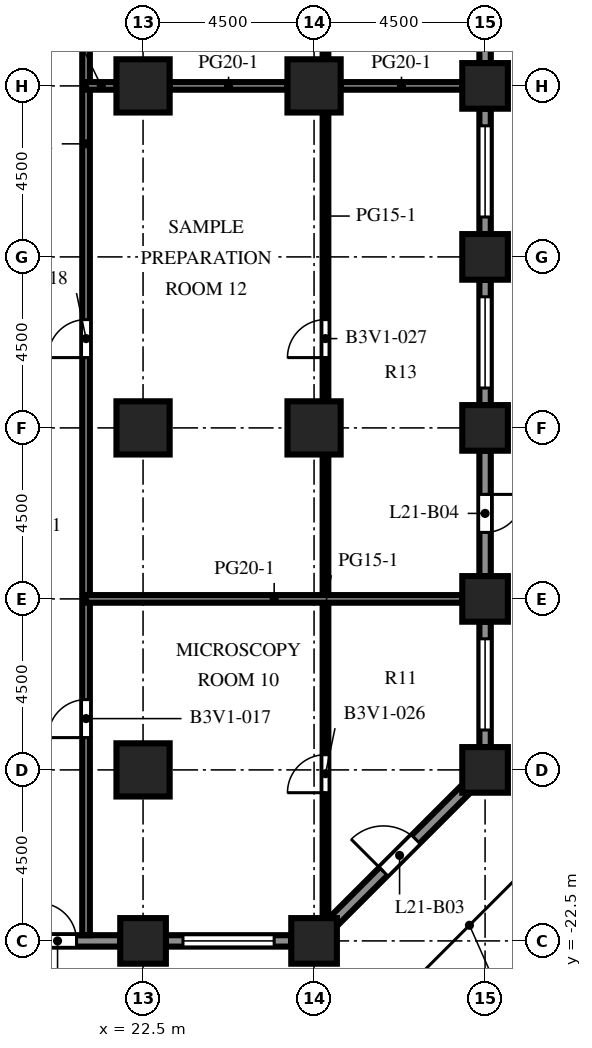
"""IFC4 building model, lengths in metres.
Left out: names, types, materials, properties, quantities, classifications, styles, units other than length and angle.
Written with IfcOpenShell. Run it as: python <this file> out.ifc"""

import sys

from ifc_helpers import new_model, si_unit, direction, frame, frame_2d, origin, origin_2d, place, context, subcontext, project, spatial, rectangle, extrude, element, fill, save


model = new_model("IFC4")
c1 = context("Model", 3, precision=1e-05, world=origin(), true_north=direction((0.0, 1.0)))
c2 = subcontext(c1, "Body", "Model", "MODEL_VIEW")
j1 = project(units=[si_unit("LENGTHUNIT", "METRE"), si_unit("PLANEANGLEUNIT", "RADIAN")], contexts=[c1])
p1 = place(None, origin())
s1 = spatial("IfcSite", under=j1, at=p1, CompositionType="ELEMENT")
p2 = place(p1, origin())
s2 = spatial("IfcBuilding", under=s1, at=p2, CompositionType="ELEMENT")
p3 = place(p2, frame((0.0, 0.0, 94.3)))
s3 = spatial("IfcBuildingStorey", under=s2, at=p3, CompositionType="ELEMENT", Elevation=94.3)
for number, where, z_axis, x_axis in (
    (1, (22.5, -22.5, 0.0), (0.0, 0.0, 1.0), (1.0, 0.0, 0.0)),
    (2, (27.0, -22.5, 0.0), (0.0, 0.0, 1.0), (1.0, 0.0, 0.0)),
    (3, (31.5, -18.0, 0.0), (0.0, 0.0, 1.0), (1.0, 0.0, 0.0)),
    (4, (31.5, -13.5, 0.0), (0.0, 0.0, 1.0), (1.0, 0.0, 0.0)),
    (5, (31.5, -9.0, 0.0), (0.0, 0.0, 1.0), (1.0, 0.0, 0.0)),
    (6, (31.5, -4.5, 0.0), (0.0, 0.0, 1.0), (1.0, 0.0, 0.0)),
    (7, (31.5, 0.0, 0.0), (0.0, 0.0, 1.0), (1.0, 0.0, 0.0)),
):
    element("IfcColumn", number, at=place(p3, frame(where, z_axis=z_axis, x_axis=x_axis)), inside=s3, PredefinedType="COLUMN", context=c2, shape_type="SweptSolid", body=[
        extrude(rectangle(XDim=1.2, YDim=1.2, at=origin_2d()), origin(), (0.0, 0.0, 1.0), 4.1),
    ])
for number, where, z_axis, x_axis in (
    (8, (22.5, -18.0, 0.0), (0.0, 0.0, 1.0), (1.0, 0.0, 0.0)),
    (9, (22.5, -9.0, 0.0), (0.0, 0.0, 1.0), (1.0, 0.0, 0.0)),
    (10, (22.5, 0.0, 0.0), (0.0, 0.0, 1.0), (1.0, 0.0, 0.0)),
    (11, (27.0, -9.0, 0.0), (0.0, 0.0, 1.0), (1.0, 0.0, 0.0)),
    (12, (27.0, 0.0, 0.0), (0.0, 0.0, 1.0), (1.0, 0.0, 0.0)),
):
    element("IfcColumn", number, at=place(p3, frame(where, z_axis=z_axis, x_axis=x_axis)), inside=s3, PredefinedType="COLUMN", context=c2, shape_type="SweptSolid", body=[
        extrude(rectangle(XDim=1.4, YDim=1.4, at=origin_2d()), origin(), (0.0, 0.0, 1.0), 4.1),
    ])
p4 = place(p3, frame((21.9, -22.5, 0.0), z_axis=(0.0, 0.0, 1.0), x_axis=(-1.0, 0.0, 0.0)))
e13 = element("IfcWall", 13, at=p4, inside=s3, PredefinedType="SOLIDWALL", context=c2, shape_type="SweptSolid", body=[
    extrude(rectangle(XDim=3.3, YDim=0.3, at=frame_2d((1.65, 0.0))), origin(), (0.0, 0.0, 1.0), 2.75),
])
p5 = place(p4, frame((1.15, 0.0, 0.0)))
e14 = element("IfcOpeningElement", 14, at=p5, cuts=e13, PredefinedType="OPENING", context=c2, shape_type="SweptSolid", body=[
    extrude(rectangle(XDim=1.0, YDim=2.2, at=frame_2d((0.5, 1.1))), frame((0.0, 0.16, 0.0), z_axis=(0.0, -1.0, 0.0), x_axis=(1.0, 0.0, 0.0)), (0.0, 0.0, 1.0), 0.32),
])
p6 = place(p3, frame((26.4, -22.5, 0.0), z_axis=(0.0, 0.0, 1.0), x_axis=(-1.0, 0.0, 0.0)))
e15 = element("IfcWall", 15, at=p6, inside=s3, PredefinedType="SOLIDWALL", context=c2, shape_type="SweptSolid", body=[
    extrude(rectangle(XDim=3.3, YDim=0.3, at=frame_2d((1.65, 0.0))), origin(), (0.0, 0.0, 1.0), 2.75),
])
p7 = place(p6, frame((0.45, 0.0, 0.8)))
e16 = element("IfcOpeningElement", 16, at=p7, cuts=e15, PredefinedType="OPENING", context=c2, shape_type="SweptSolid", body=[
    extrude(rectangle(XDim=2.4, YDim=1.7, at=frame_2d((1.2, 0.85))), frame((0.0, 0.16, 0.0), z_axis=(0.0, -1.0, 0.0), x_axis=(1.0, 0.0, 0.0)), (0.0, 0.0, 1.0), 0.32),
])
p8 = place(p3, frame((31.006, -18.494, 0.0), z_axis=(0.0, 0.0, 1.0), x_axis=(-0.707106781187, -0.707106781187, 0.0)))
e17 = element("IfcWall", 17, at=p8, inside=s3, PredefinedType="SOLIDWALL", context=c2, shape_type="SweptSolid", body=[
    extrude(rectangle(XDim=4.967, YDim=0.3, at=frame_2d((2.483, 0.0))), origin(), (0.0, 0.0, 1.0), 2.75),
])
p9 = place(p8, frame((1.884, 0.0, 0.0)))
e18 = element("IfcOpeningElement", 18, at=p9, cuts=e17, PredefinedType="OPENING", context=c2, shape_type="SweptSolid", body=[
    extrude(rectangle(XDim=1.2, YDim=2.2, at=frame_2d((0.6, 1.1))), frame((0.0, 0.16, 0.0), z_axis=(0.0, -1.0, 0.0), x_axis=(1.0, 0.0, 0.0)), (0.0, 0.0, 1.0), 0.32),
])
p10 = place(p3, frame((31.5, -14.1, 0.0), z_axis=(0.0, 0.0, 1.0), x_axis=(0.0, -1.0, 0.0)))
e19 = element("IfcWall", 19, at=p10, inside=s3, PredefinedType="SOLIDWALL", context=c2, shape_type="SweptSolid", body=[
    extrude(rectangle(XDim=3.3, YDim=0.3, at=frame_2d((1.65, 0.0))), origin(), (0.0, 0.0, 1.0), 2.75),
])
p11 = place(p10, frame((0.45, 0.0, 0.8)))
e20 = element("IfcOpeningElement", 20, at=p11, cuts=e19, PredefinedType="OPENING", context=c2, shape_type="SweptSolid", body=[
    extrude(rectangle(XDim=2.4, YDim=1.7, at=frame_2d((1.2, 0.85))), frame((0.0, 0.16, 0.0), z_axis=(0.0, -1.0, 0.0), x_axis=(1.0, 0.0, 0.0)), (0.0, 0.0, 1.0), 0.32),
])
p12 = place(p3, frame((31.5, -9.6, 0.0), z_axis=(0.0, 0.0, 1.0), x_axis=(0.0, -1.0, 0.0)))
e21 = element("IfcWall", 21, at=p12, inside=s3, PredefinedType="SOLIDWALL", context=c2, shape_type="SweptSolid", body=[
    extrude(rectangle(XDim=3.3, YDim=0.3, at=frame_2d((1.65, 0.0))), origin(), (0.0, 0.0, 1.0), 2.75),
])
p13 = place(p12, frame((1.15, 0.0, 0.0)))
e22 = element("IfcOpeningElement", 22, at=p13, cuts=e21, PredefinedType="OPENING", context=c2, shape_type="SweptSolid", body=[
    extrude(rectangle(XDim=1.0, YDim=2.2, at=frame_2d((0.5, 1.1))), frame((0.0, 0.16, 0.0), z_axis=(0.0, -1.0, 0.0), x_axis=(1.0, 0.0, 0.0)), (0.0, 0.0, 1.0), 0.32),
])
p14 = place(p3, frame((31.5, -5.1, 0.0), z_axis=(0.0, 0.0, 1.0), x_axis=(0.0, -1.0, 0.0)))
e23 = element("IfcWall", 23, at=p14, inside=s3, PredefinedType="SOLIDWALL", context=c2, shape_type="SweptSolid", body=[
    extrude(rectangle(XDim=3.3, YDim=0.3, at=frame_2d((1.65, 0.0))), origin(), (0.0, 0.0, 1.0), 2.75),
])
p15 = place(p14, frame((0.45, 0.0, 0.8)))
e24 = element("IfcOpeningElement", 24, at=p15, cuts=e23, PredefinedType="OPENING", context=c2, shape_type="SweptSolid", body=[
    extrude(rectangle(XDim=2.4, YDim=1.7, at=frame_2d((1.2, 0.85))), frame((0.0, 0.16, 0.0), z_axis=(0.0, -1.0, 0.0), x_axis=(1.0, 0.0, 0.0)), (0.0, 0.0, 1.0), 0.32),
])
p16 = place(p3, frame((31.5, -0.6, 0.0), z_axis=(0.0, 0.0, 1.0), x_axis=(0.0, -1.0, 0.0)))
e25 = element("IfcWall", 25, at=p16, inside=s3, PredefinedType="SOLIDWALL", context=c2, shape_type="SweptSolid", body=[
    extrude(rectangle(XDim=3.3, YDim=0.3, at=frame_2d((1.65, 0.0))), origin(), (0.0, 0.0, 1.0), 2.75),
])
p17 = place(p16, frame((0.45, 0.0, 0.8)))
e26 = element("IfcOpeningElement", 26, at=p17, cuts=e25, PredefinedType="OPENING", context=c2, shape_type="SweptSolid", body=[
    extrude(rectangle(XDim=2.4, YDim=1.7, at=frame_2d((1.2, 0.85))), frame((0.0, 0.16, 0.0), z_axis=(0.0, -1.0, 0.0), x_axis=(1.0, 0.0, 0.0)), (0.0, 0.0, 1.0), 0.32),
])
p18 = place(p3, frame((31.5, 3.9, 0.0), z_axis=(0.0, 0.0, 1.0), x_axis=(0.0, -1.0, 0.0)))
e27 = element("IfcWall", 27, at=p18, inside=s3, PredefinedType="SOLIDWALL", context=c2, shape_type="SweptSolid", body=[
    extrude(rectangle(XDim=3.3, YDim=0.3, at=frame_2d((1.65, 0.0))), origin(), (0.0, 0.0, 1.0), 2.75),
])
p19 = place(p18, frame((0.45, 0.0, 0.8)))
e28 = element("IfcOpeningElement", 28, at=p19, cuts=e27, PredefinedType="OPENING", context=c2, shape_type="SweptSolid", body=[
    extrude(rectangle(XDim=2.4, YDim=1.7, at=frame_2d((1.2, 0.85))), frame((0.0, 0.16, 0.0), z_axis=(0.0, -1.0, 0.0), x_axis=(1.0, 0.0, 0.0)), (0.0, 0.0, 1.0), 0.32),
])
p20 = place(p3, frame((21.0, 31.35, 0.0), z_axis=(0.0, 0.0, 1.0), x_axis=(0.0, -1.0, 0.0)))
e29 = element("IfcWall", 29, at=p20, inside=s3, PredefinedType="PARTITIONING", context=c2, shape_type="SweptSolid", body=[
    extrude(rectangle(XDim=53.7, YDim=0.2, at=frame_2d((26.85, 0.0))), origin(), (0.0, 0.0, 1.0), 3.65),
])
p21 = place(p20, frame((47.5, 0.0, 0.0)))
e30 = element("IfcOpeningElement", 30, at=p21, cuts=e29, PredefinedType="OPENING", context=c2, shape_type="SweptSolid", body=[
    extrude(rectangle(XDim=1.0, YDim=2.1, at=frame_2d((0.5, 1.05))), frame((0.0, 0.11, 0.0), z_axis=(0.0, -1.0, 0.0), x_axis=(1.0, 0.0, 0.0)), (0.0, 0.0, 1.0), 0.22),
])
p22 = place(p20, frame((37.5, 0.0, 0.0)))
e31 = element("IfcOpeningElement", 31, at=p22, cuts=e29, PredefinedType="OPENING", context=c2, shape_type="SweptSolid", body=[
    extrude(rectangle(XDim=1.0, YDim=2.1, at=frame_2d((0.5, 1.05))), frame((0.0, 0.11, 0.0), z_axis=(0.0, -1.0, 0.0), x_axis=(1.0, 0.0, 0.0)), (0.0, 0.0, 1.0), 0.22),
])
p23 = place(p20, frame((27.25, 0.0, 0.0)))
e32 = element("IfcOpeningElement", 32, at=p23, cuts=e29, PredefinedType="OPENING", context=c2, shape_type="SweptSolid", body=[
    extrude(rectangle(XDim=1.0, YDim=2.1, at=frame_2d((0.5, 1.05))), frame((0.0, 0.11, 0.0), z_axis=(0.0, -1.0, 0.0), x_axis=(1.0, 0.0, 0.0)), (0.0, 0.0, 1.0), 0.22),
])
p24 = place(p20, frame((17.5, 0.0, 0.0)))
e33 = element("IfcOpeningElement", 33, at=p24, cuts=e29, PredefinedType="OPENING", context=c2, shape_type="SweptSolid", body=[
    extrude(rectangle(XDim=1.0, YDim=2.1, at=frame_2d((0.5, 1.05))), frame((0.0, 0.11, 0.0), z_axis=(0.0, -1.0, 0.0), x_axis=(1.0, 0.0, 0.0)), (0.0, 0.0, 1.0), 0.22),
])
p25 = place(p20, frame((10.75, 0.0, 0.0)))
e34 = element("IfcOpeningElement", 34, at=p25, cuts=e29, PredefinedType="OPENING", context=c2, shape_type="SweptSolid", body=[
    extrude(rectangle(XDim=1.0, YDim=2.1, at=frame_2d((0.5, 1.05))), frame((0.0, 0.11, 0.0), z_axis=(0.0, -1.0, 0.0), x_axis=(1.0, 0.0, 0.0)), (0.0, 0.0, 1.0), 0.22),
])
p26 = place(p20, frame((5.25, 0.0, 0.0)))
e35 = element("IfcOpeningElement", 35, at=p26, cuts=e29, PredefinedType="OPENING", context=c2, shape_type="SweptSolid", body=[
    extrude(rectangle(XDim=1.0, YDim=2.1, at=frame_2d((0.5, 1.05))), frame((0.0, 0.11, 0.0), z_axis=(0.0, -1.0, 0.0), x_axis=(1.0, 0.0, 0.0)), (0.0, 0.0, 1.0), 0.22),
])
p27 = place(p3, frame((27.3, -9.7, 0.0), z_axis=(0.0, 0.0, 1.0), x_axis=(0.0, -1.0, 0.0)))
e36 = element("IfcWall", 36, at=p27, inside=s3, PredefinedType="PARTITIONING", context=c2, shape_type="SweptSolid", body=[
    extrude(rectangle(XDim=12.077, YDim=0.15, at=frame_2d((6.039, 0.0))), origin(), (0.0, 0.0, 1.0), 3.65),
])
p28 = place(p27, frame((7.9, 0.0, 0.0)))
e37 = element("IfcOpeningElement", 37, at=p28, cuts=e36, PredefinedType="OPENING", context=c2, shape_type="SweptSolid", body=[
    extrude(rectangle(XDim=1.0, YDim=2.1, at=frame_2d((0.5, 1.05))), frame((0.0, 0.085, 0.0), z_axis=(0.0, -1.0, 0.0), x_axis=(1.0, 0.0, 0.0)), (0.0, 0.0, 1.0), 0.17),
])
p29 = place(p3, frame((27.3, -0.7, 0.0), z_axis=(0.0, 0.0, 1.0), x_axis=(0.0, -1.0, 0.0)))
e38 = element("IfcWall", 38, at=p29, inside=s3, PredefinedType="PARTITIONING", context=c2, shape_type="SweptSolid", body=[
    extrude(rectangle(XDim=7.6, YDim=0.15, at=frame_2d((3.8, 0.0))), origin(), (0.0, 0.0, 1.0), 3.65),
])
p30 = place(p29, frame((5.45, 0.0, 0.0)))
e39 = element("IfcOpeningElement", 39, at=p30, cuts=e38, PredefinedType="OPENING", context=c2, shape_type="SweptSolid", body=[
    extrude(rectangle(XDim=1.0, YDim=2.1, at=frame_2d((0.5, 1.05))), frame((0.0, 0.085, 0.0), z_axis=(0.0, -1.0, 0.0), x_axis=(1.0, 0.0, 0.0)), (0.0, 0.0, 1.0), 0.17),
])
p31 = place(p3, frame((27.3, 8.3, 0.0), z_axis=(0.0, 0.0, 1.0), x_axis=(0.0, -1.0, 0.0)))
e40 = element("IfcWall", 40, at=p31, inside=s3, PredefinedType="PARTITIONING", context=c2, shape_type="SweptSolid", body=[
    extrude(rectangle(XDim=7.6, YDim=0.15, at=frame_2d((3.8, 0.0))), origin(), (0.0, 0.0, 1.0), 3.65),
])
p32 = place(p31, frame((2.7, 0.0, 0.0)))
e41 = element("IfcOpeningElement", 41, at=p32, cuts=e40, PredefinedType="OPENING", context=c2, shape_type="SweptSolid", body=[
    extrude(rectangle(XDim=1.0, YDim=2.1, at=frame_2d((0.5, 1.05))), frame((0.0, 0.085, 0.0), z_axis=(0.0, -1.0, 0.0), x_axis=(1.0, 0.0, 0.0)), (0.0, 0.0, 1.0), 0.17),
])
p33 = place(p3, frame((21.0, -13.5, 0.0), z_axis=(0.0, 0.0, 1.0), x_axis=(1.0, 0.0, 0.0)))
e42 = element("IfcWall", 42, at=p33, inside=s3, PredefinedType="PARTITIONING", context=c2, shape_type="SweptSolid", body=[
    extrude(rectangle(XDim=9.9, YDim=0.2, at=frame_2d((4.95, 0.0))), origin(), (0.0, 0.0, 1.0), 3.65),
])
p34 = place(p3, frame((21.0, 0.0, 0.0), z_axis=(0.0, 0.0, 1.0), x_axis=(1.0, 0.0, 0.0)))
e43 = element("IfcWall", 43, at=p34, inside=s3, PredefinedType="PARTITIONING", context=c2, shape_type="SweptSolid", body=[
    extrude(rectangle(XDim=0.8, YDim=0.2, at=frame_2d((0.4, 0.0))), origin(), (0.0, 0.0, 1.0), 3.65),
])
p35 = place(p3, frame((23.2, 0.0, 0.0), z_axis=(0.0, 0.0, 1.0), x_axis=(1.0, 0.0, 0.0)))
e44 = element("IfcWall", 44, at=p35, inside=s3, PredefinedType="PARTITIONING", context=c2, shape_type="SweptSolid", body=[
    extrude(rectangle(XDim=3.1, YDim=0.2, at=frame_2d((1.55, 0.0))), origin(), (0.0, 0.0, 1.0), 3.65),
])
p36 = place(p3, frame((27.7, 0.0, 0.0), z_axis=(0.0, 0.0, 1.0), x_axis=(1.0, 0.0, 0.0)))
e45 = element("IfcWall", 45, at=p36, inside=s3, PredefinedType="PARTITIONING", context=c2, shape_type="SweptSolid", body=[
    extrude(rectangle(XDim=3.2, YDim=0.2, at=frame_2d((1.6, 0.0))), origin(), (0.0, 0.0, 1.0), 3.65),
])
p37 = place(p5, origin())
e46 = element("IfcDoor", 46, at=p37, inside=s3, OperationType="SINGLE_SWING_RIGHT", PredefinedType="DOOR", context=c2, shape_type="SweptSolid", body=[
    extrude(rectangle(XDim=1.0, YDim=2.2, at=frame_2d((0.5, 1.1))), frame((0.0, 0.025, 0.0), z_axis=(0.0, -1.0, 0.0), x_axis=(1.0, 0.0, 0.0)), (0.0, 0.0, 1.0), 0.05),
])
fill(e14, e46)
p38 = place(p7, origin())
e47 = element("IfcWindow", 47, at=p38, inside=s3, PartitioningType="SINGLE_PANEL", PredefinedType="WINDOW", context=c2, shape_type="SweptSolid", body=[
    extrude(rectangle(XDim=2.4, YDim=1.7, at=frame_2d((1.2, 0.85))), frame((0.0, 0.03, 0.0), z_axis=(0.0, -1.0, 0.0), x_axis=(1.0, 0.0, 0.0)), (0.0, 0.0, 1.0), 0.06),
])
fill(e16, e47)
p39 = place(p9, origin())
e48 = element("IfcDoor", 48, at=p39, inside=s3, OperationType="SINGLE_SWING_RIGHT", PredefinedType="DOOR", context=c2, shape_type="SweptSolid", body=[
    extrude(rectangle(XDim=1.2, YDim=2.2, at=frame_2d((0.6, 1.1))), frame((0.0, 0.025, 0.0), z_axis=(0.0, -1.0, 0.0), x_axis=(1.0, 0.0, 0.0)), (0.0, 0.0, 1.0), 0.05),
])
fill(e18, e48)
p40 = place(p11, origin())
e49 = element("IfcWindow", 49, at=p40, inside=s3, PartitioningType="SINGLE_PANEL", PredefinedType="WINDOW", context=c2, shape_type="SweptSolid", body=[
    extrude(rectangle(XDim=2.4, YDim=1.7, at=frame_2d((1.2, 0.85))), frame((0.0, 0.03, 0.0), z_axis=(0.0, -1.0, 0.0), x_axis=(1.0, 0.0, 0.0)), (0.0, 0.0, 1.0), 0.06),
])
fill(e20, e49)
p41 = place(p13, origin())
e50 = element("IfcDoor", 50, at=p41, inside=s3, OperationType="SINGLE_SWING_LEFT", PredefinedType="DOOR", context=c2, shape_type="SweptSolid", body=[
    extrude(rectangle(XDim=1.0, YDim=2.2, at=frame_2d((0.5, 1.1))), frame((0.0, 0.025, 0.0), z_axis=(0.0, -1.0, 0.0), x_axis=(1.0, 0.0, 0.0)), (0.0, 0.0, 1.0), 0.05),
])
fill(e22, e50)
p42 = place(p15, origin())
e51 = element("IfcWindow", 51, at=p42, inside=s3, PartitioningType="SINGLE_PANEL", PredefinedType="WINDOW", context=c2, shape_type="SweptSolid", body=[
    extrude(rectangle(XDim=2.4, YDim=1.7, at=frame_2d((1.2, 0.85))), frame((0.0, 0.03, 0.0), z_axis=(0.0, -1.0, 0.0), x_axis=(1.0, 0.0, 0.0)), (0.0, 0.0, 1.0), 0.06),
])
fill(e24, e51)
p43 = place(p17, origin())
e52 = element("IfcWindow", 52, at=p43, inside=s3, PartitioningType="SINGLE_PANEL", PredefinedType="WINDOW", context=c2, shape_type="SweptSolid", body=[
    extrude(rectangle(XDim=2.4, YDim=1.7, at=frame_2d((1.2, 0.85))), frame((0.0, 0.03, 0.0), z_axis=(0.0, -1.0, 0.0), x_axis=(1.0, 0.0, 0.0)), (0.0, 0.0, 1.0), 0.06),
])
fill(e26, e52)
p44 = place(p21, origin())
e53 = element("IfcDoor", 53, at=p44, inside=s3, OperationType="SINGLE_SWING_RIGHT", PredefinedType="DOOR", context=c2, shape_type="SweptSolid", body=[
    extrude(rectangle(XDim=1.0, YDim=2.1, at=frame_2d((0.5, 1.05))), frame((0.0, 0.025, 0.0), z_axis=(0.0, -1.0, 0.0), x_axis=(1.0, 0.0, 0.0)), (0.0, 0.0, 1.0), 0.05),
])
fill(e30, e53)
p45 = place(p22, origin())
e54 = element("IfcDoor", 54, at=p45, inside=s3, OperationType="SINGLE_SWING_RIGHT", PredefinedType="DOOR", context=c2, shape_type="SweptSolid", body=[
    extrude(rectangle(XDim=1.0, YDim=2.1, at=frame_2d((0.5, 1.05))), frame((0.0, 0.025, 0.0), z_axis=(0.0, -1.0, 0.0), x_axis=(1.0, 0.0, 0.0)), (0.0, 0.0, 1.0), 0.05),
])
fill(e31, e54)
p46 = place(p28, origin())
e55 = element("IfcDoor", 55, at=p46, inside=s3, OperationType="SINGLE_SWING_RIGHT", PredefinedType="DOOR", context=c2, shape_type="SweptSolid", body=[
    extrude(rectangle(XDim=1.0, YDim=2.1, at=frame_2d((0.5, 1.05))), frame((0.0, 0.025, 0.0), z_axis=(0.0, -1.0, 0.0), x_axis=(1.0, 0.0, 0.0)), (0.0, 0.0, 1.0), 0.05),
])
fill(e37, e55)
p47 = place(p30, origin())
e56 = element("IfcDoor", 56, at=p47, inside=s3, OperationType="SINGLE_SWING_RIGHT", PredefinedType="DOOR", context=c2, shape_type="SweptSolid", body=[
    extrude(rectangle(XDim=1.0, YDim=2.1, at=frame_2d((0.5, 1.05))), frame((0.0, 0.025, 0.0), z_axis=(0.0, -1.0, 0.0), x_axis=(1.0, 0.0, 0.0)), (0.0, 0.0, 1.0), 0.05),
])
fill(e39, e56)
save(model, sys.argv[1])
